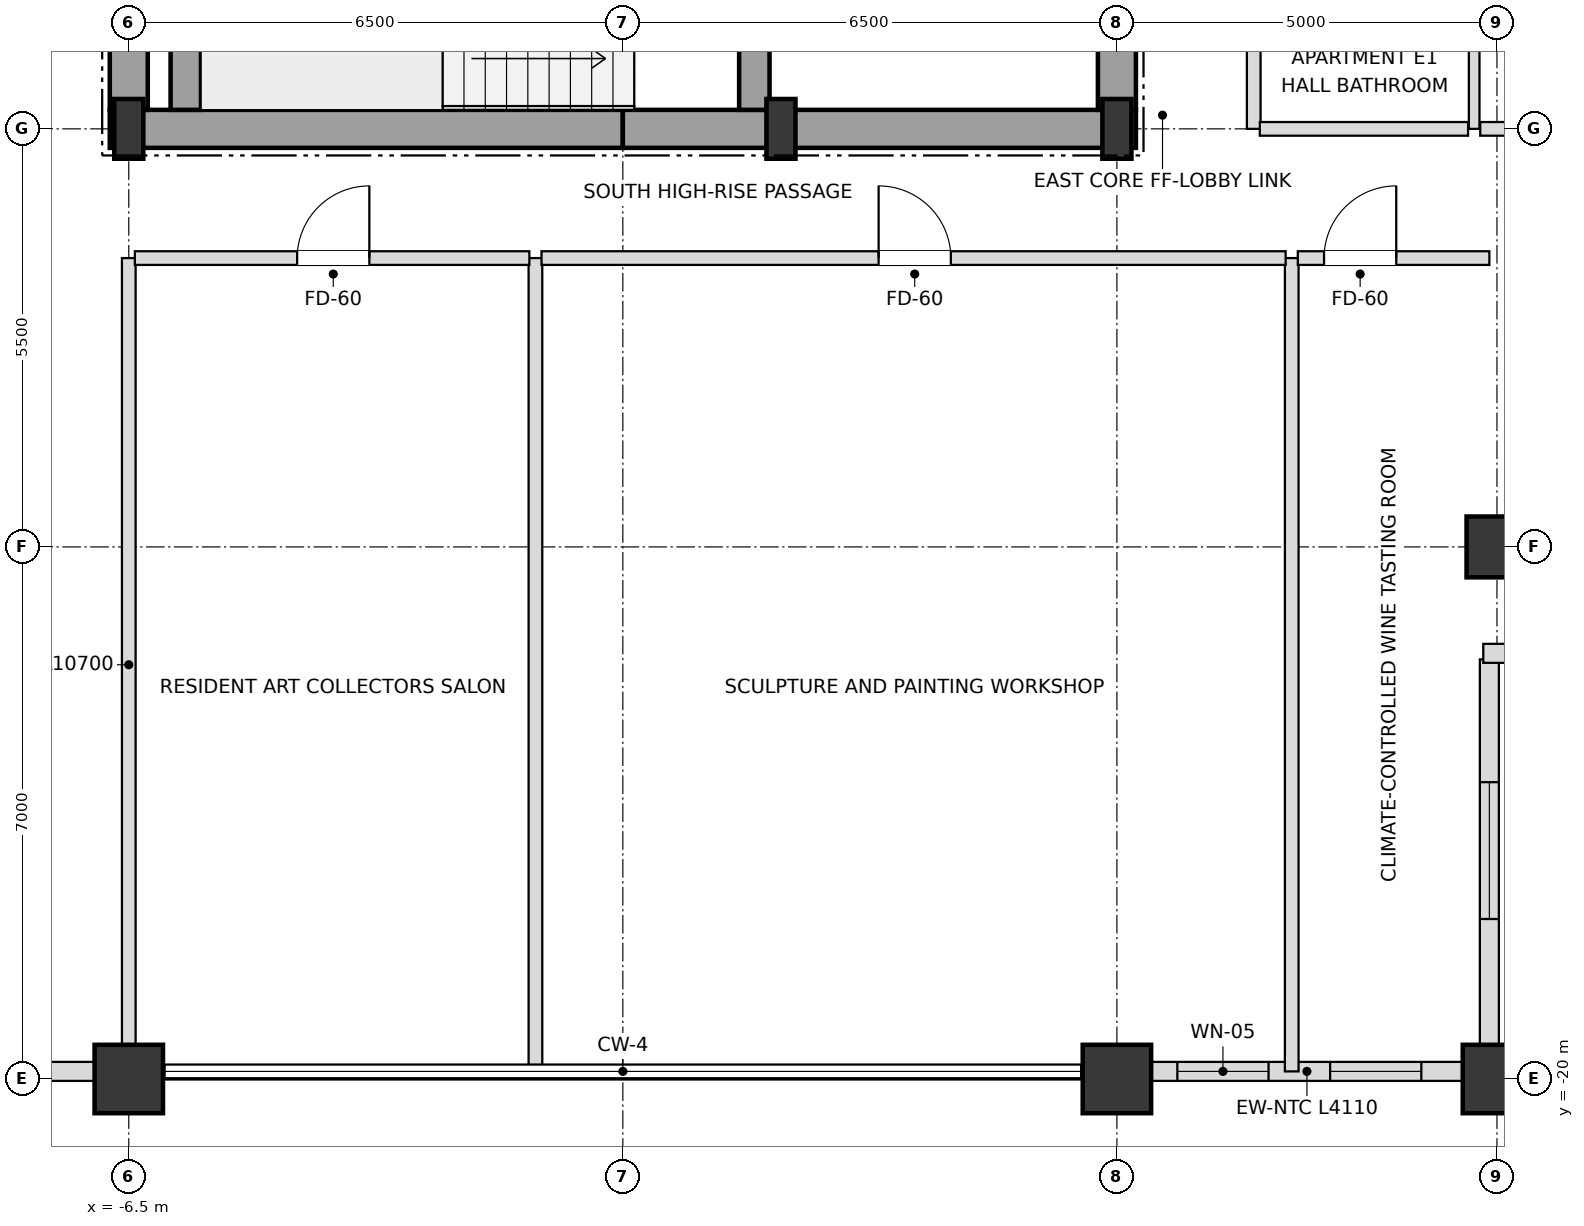
"""IFC4 building model, lengths in metres.
Left out: names, types, materials, properties, quantities, classifications, styles, units other than length and angle.
Written with IfcOpenShell. Run it as: python <this file> out.ifc"""

import sys

from ifc_helpers import new_model, si_unit, direction, frame, frame_2d, origin, origin_2d, place, context, subcontext, project, spatial, rectangle, i_section, extrude, element, fill, save


model = new_model("IFC4")
c1 = context("Model", 3, precision=1e-05, world=origin(), true_north=direction((0.0, 1.0)))
c2 = subcontext(c1, "Body", "Model", "MODEL_VIEW")
j1 = project(units=[si_unit("LENGTHUNIT", "METRE"), si_unit("PLANEANGLEUNIT", "RADIAN")], contexts=[c1])
p1 = place(None, origin())
s1 = spatial("IfcSite", under=j1, at=p1, CompositionType="ELEMENT")
p2 = place(p1, origin())
s2 = spatial("IfcBuilding", under=s1, at=p2, CompositionType="ELEMENT")
p3 = place(p2, frame((0.0, 0.0, 290.7)))
s3 = spatial("IfcBuildingStorey", under=s2, at=p3, CompositionType="ELEMENT", Elevation=290.7)
for number, where, z_axis, x_axis in (
    (1, (-6.5, -7.5, 0.0), (0.0, 0.0, 1.0), (1.0, 0.0, 0.0)),
    (2, (2.08, -7.5, 0.0), (0.0, 0.0, 1.0), (1.0, 0.0, 0.0)),
    (3, (6.5, -7.5, 0.0), (0.0, 0.0, 1.0), (1.0, 0.0, 0.0)),
):
    element("IfcColumn", number, at=place(p3, frame(where, z_axis=z_axis, x_axis=x_axis)), inside=s3, PredefinedType="COLUMN", context=c2, shape_type="SweptSolid", body=[
        extrude(i_section(OverallWidth=0.382, OverallDepth=0.786, WebThickness=0.02, FlangeThickness=0.033, at=origin_2d()), origin(), (0.0, 0.0, 1.0), 3.6),
    ])
for number, where, z_axis, x_axis in (
    (4, (-6.5, -20.0, 0.0), (0.0, 0.0, 1.0), (1.0, 0.0, 0.0)),
    (5, (6.5, -20.0, 0.0), (0.0, 0.0, 1.0), (1.0, 0.0, 0.0)),
    (6, (11.5, -20.0, 0.0), (0.0, 0.0, 1.0), (1.0, 0.0, 0.0)),
):
    element("IfcColumn", number, at=place(p3, frame(where, z_axis=z_axis, x_axis=x_axis)), inside=s3, PredefinedType="USERDEFINED", context=c2, shape_type="SweptSolid", body=[
        extrude(rectangle(XDim=0.9, YDim=0.9, at=origin_2d()), origin(), (0.0, 0.0, 1.0), 3.6),
    ])
p4 = place(p3, frame((11.5, -13.0, 0.0), z_axis=(0.0, 0.0, 1.0), x_axis=(1.0, 0.0, 0.0)))
e7 = element("IfcColumn", 7, at=p4, inside=s3, PredefinedType="COLUMN", context=c2, shape_type="SweptSolid", body=[
    extrude(rectangle(XDim=0.8, YDim=0.8, at=origin_2d()), origin(), (0.0, 0.0, 1.0), 3.6),
])
p5 = place(p3, frame((-11.055, -19.9, 0.0), z_axis=(0.0, 0.0, 1.0), x_axis=(1.0, 0.0, 0.0)))
e8 = element("IfcWall", 8, at=p5, inside=s3, PredefinedType="SOLIDWALL", context=c2, shape_type="SweptSolid", body=[
    extrude(rectangle(XDim=4.11, YDim=0.25, at=frame_2d((2.055, 0.0))), origin(), (0.0, 0.0, 1.0), 2.748),
])
p6 = place(p5, frame((1.155, 0.0, 0.72)))
e9 = element("IfcOpeningElement", 9, at=p6, cuts=e8, PredefinedType="OPENING", context=c2, shape_type="SweptSolid", body=[
    extrude(rectangle(XDim=1.8, YDim=1.68, at=frame_2d((0.9, 0.84))), frame((0.0, 0.135, 0.0), z_axis=(0.0, -1.0, 0.0), x_axis=(1.0, 0.0, 0.0)), (0.0, 0.0, 1.0), 0.27),
])
p7 = place(p3, frame((6.945, -19.9, 0.0), z_axis=(0.0, 0.0, 1.0), x_axis=(1.0, 0.0, 0.0)))
e10 = element("IfcWall", 10, at=p7, inside=s3, PredefinedType="SOLIDWALL", context=c2, shape_type="SweptSolid", body=[
    extrude(rectangle(XDim=4.11, YDim=0.25, at=frame_2d((2.055, 0.0))), origin(), (0.0, 0.0, 1.0), 2.748),
])
p8 = place(p7, frame((0.35, 0.0, 0.72)))
e11 = element("IfcOpeningElement", 11, at=p8, cuts=e10, PredefinedType="OPENING", context=c2, shape_type="SweptSolid", body=[
    extrude(rectangle(XDim=1.2, YDim=1.68, at=frame_2d((0.6, 0.84))), frame((0.0, 0.135, 0.0), z_axis=(0.0, -1.0, 0.0), x_axis=(1.0, 0.0, 0.0)), (0.0, 0.0, 1.0), 0.27),
])
p9 = place(p7, frame((2.36, 0.0, 0.72)))
e12 = element("IfcOpeningElement", 12, at=p9, cuts=e10, PredefinedType="OPENING", context=c2, shape_type="SweptSolid", body=[
    extrude(rectangle(XDim=1.2, YDim=1.68, at=frame_2d((0.6, 0.84))), frame((0.0, 0.135, 0.0), z_axis=(0.0, -1.0, 0.0), x_axis=(1.0, 0.0, 0.0)), (0.0, 0.0, 1.0), 0.27),
])
p10 = place(p3, frame((11.4, -19.82, 0.0), z_axis=(0.0, 0.0, 1.0), x_axis=(0.0, 1.0, 0.0)))
e13 = element("IfcWall", 13, at=p10, inside=s3, PredefinedType="SOLIDWALL", context=c2, shape_type="SweptSolid", body=[
    extrude(rectangle(XDim=5.34, YDim=0.25, at=frame_2d((2.67, 0.0))), origin(), (0.0, 0.0, 1.0), 2.748),
])
p11 = place(p10, frame((1.925, 0.0, 0.72)))
e14 = element("IfcOpeningElement", 14, at=p11, cuts=e13, PredefinedType="OPENING", context=c2, shape_type="SweptSolid", body=[
    extrude(rectangle(XDim=1.8, YDim=1.68, at=frame_2d((0.9, 0.84))), frame((0.0, 0.135, 0.0), z_axis=(0.0, -1.0, 0.0), x_axis=(1.0, 0.0, 0.0)), (0.0, 0.0, 1.0), 0.27),
])
p12 = place(p3, frame((11.32, -14.4, 0.0), z_axis=(0.0, 0.0, 1.0), x_axis=(1.0, 0.0, 0.0)))
e15 = element("IfcWall", 15, at=p12, inside=s3, PredefinedType="SOLIDWALL", context=c2, shape_type="SweptSolid", body=[
    extrude(rectangle(XDim=5.66, YDim=0.25, at=frame_2d((2.83, 0.0))), origin(), (0.0, 0.0, 1.0), 2.748),
])
p13 = place(p12, frame((0.595, 0.0, 0.72)))
e16 = element("IfcOpeningElement", 16, at=p13, cuts=e15, PredefinedType="OPENING", context=c2, shape_type="SweptSolid", body=[
    extrude(rectangle(XDim=1.8, YDim=1.68, at=frame_2d((0.9, 0.84))), frame((0.0, 0.135, 0.0), z_axis=(0.0, -1.0, 0.0), x_axis=(1.0, 0.0, 0.0)), (0.0, 0.0, 1.0), 0.27),
])
p14 = place(p12, frame((3.265, 0.0, 0.72)))
e17 = element("IfcOpeningElement", 17, at=p14, cuts=e15, PredefinedType="OPENING", context=c2, shape_type="SweptSolid", body=[
    extrude(rectangle(XDim=1.8, YDim=1.68, at=frame_2d((0.9, 0.84))), frame((0.0, 0.135, 0.0), z_axis=(0.0, -1.0, 0.0), x_axis=(1.0, 0.0, 0.0)), (0.0, 0.0, 1.0), 0.27),
])
for number, where, z_axis, x_axis in (
    (18, (-6.75, -7.5, 0.0), (0.0, 0.0, 1.0), (1.0, 0.0, 0.0)),
    (19, (0.0, -7.5, 0.0), (0.0, 0.0, 1.0), (1.0, 0.0, 0.0)),
):
    element("IfcWall", number, at=place(p3, frame(where, z_axis=z_axis, x_axis=x_axis)), inside=s3, PredefinedType="SHEAR", context=c2, shape_type="SweptSolid", body=[
        extrude(rectangle(XDim=6.75, YDim=0.5, at=frame_2d((3.375, 0.0))), origin(), (0.0, 0.0, 1.0), 3.38),
    ])
p15 = place(p3, frame((-6.5, -7.25, 0.0), z_axis=(0.0, 0.0, 1.0), x_axis=(0.0, 1.0, 0.0)))
e20 = element("IfcWall", 20, at=p15, inside=s3, PredefinedType="SHEAR", context=c2, shape_type="SweptSolid", body=[
    extrude(rectangle(XDim=3.55, YDim=0.5, at=frame_2d((1.775, 0.0))), origin(), (0.0, 0.0, 1.0), 3.38),
])
p16 = place(p3, frame((6.5, -7.25, 0.0), z_axis=(0.0, 0.0, 1.0), x_axis=(0.0, 1.0, 0.0)))
e21 = element("IfcWall", 21, at=p16, inside=s3, PredefinedType="SHEAR", context=c2, shape_type="SweptSolid", body=[
    extrude(rectangle(XDim=5.75, YDim=0.5, at=frame_2d((2.875, 0.0))), origin(), (0.0, 0.0, 1.0), 3.38),
])
p17 = place(p16, frame((0.85, 0.0, 0.0)))
e22 = element("IfcOpeningElement", 22, at=p17, cuts=e21, PredefinedType="OPENING", context=c2, shape_type="SweptSolid", body=[
    extrude(rectangle(XDim=1.05, YDim=2.15, at=frame_2d((0.525, 1.075))), frame((0.0, 0.26, 0.0), z_axis=(0.0, -1.0, 0.0), x_axis=(1.0, 0.0, 0.0)), (0.0, 0.0, 1.0), 0.52),
])
p18 = place(p3, frame((-5.75, -7.25, 0.0), z_axis=(0.0, 0.0, 1.0), x_axis=(0.0, 1.0, 0.0)))
e23 = element("IfcWall", 23, at=p18, inside=s3, PredefinedType="SHEAR", context=c2, shape_type="SweptSolid", body=[
    extrude(rectangle(XDim=2.9, YDim=0.4, at=frame_2d((1.45, 0.0))), origin(), (0.0, 0.0, 1.0), 3.38),
])
p19 = place(p3, frame((1.73, -7.25, 0.0), z_axis=(0.0, 0.0, 1.0), x_axis=(0.0, 1.0, 0.0)))
e24 = element("IfcWall", 24, at=p19, inside=s3, PredefinedType="SHEAR", context=c2, shape_type="SweptSolid", body=[
    extrude(rectangle(XDim=3.3, YDim=0.4, at=frame_2d((1.65, 0.0))), origin(), (0.0, 0.0, 1.0), 3.38),
])
p20 = place(p19, frame((0.9, 0.0, 0.0)))
e25 = element("IfcOpeningElement", 25, at=p20, cuts=e24, PredefinedType="OPENING", context=c2, shape_type="SweptSolid", body=[
    extrude(rectangle(XDim=1.05, YDim=2.15, at=frame_2d((0.525, 1.075))), frame((0.0, 0.21, 0.0), z_axis=(0.0, -1.0, 0.0), x_axis=(1.0, 0.0, 0.0)), (0.0, 0.0, 1.0), 0.42),
])
p21 = place(p3, frame((-6.5, -19.9, 0.0), z_axis=(0.0, 0.0, 1.0), x_axis=(0.0, 1.0, 0.0)))
e26 = element("IfcWall", 26, at=p21, inside=s3, PredefinedType="PARTITIONING", context=c2, shape_type="SweptSolid", body=[
    extrude(rectangle(XDim=10.7, YDim=0.18, at=frame_2d((5.35, 0.0))), origin(), (0.0, 0.0, 1.0), 2.826),
])
p22 = place(p3, frame((-1.15, -19.9, 0.0), z_axis=(0.0, 0.0, 1.0), x_axis=(0.0, 1.0, 0.0)))
e27 = element("IfcWall", 27, at=p22, inside=s3, PredefinedType="PARTITIONING", context=c2, shape_type="SweptSolid", body=[
    extrude(rectangle(XDim=10.7, YDim=0.18, at=frame_2d((5.35, 0.0))), origin(), (0.0, 0.0, 1.0), 3.018),
])
p23 = place(p3, frame((8.3, -7.5, 0.0), z_axis=(0.0, 0.0, 1.0), x_axis=(0.0, 1.0, 0.0)))
e28 = element("IfcWall", 28, at=p23, inside=s3, PredefinedType="PARTITIONING", context=c2, shape_type="SweptSolid", body=[
    extrude(rectangle(XDim=15.0, YDim=0.18, at=frame_2d((7.5, 0.0))), origin(), (0.0, 0.0, 1.0), 3.38),
])
p24 = place(p23, frame((2.355, 0.0, 0.0)))
e29 = element("IfcOpeningElement", 29, at=p24, cuts=e28, PredefinedType="OPENING", context=c2, shape_type="SweptSolid", body=[
    extrude(rectangle(XDim=0.95, YDim=2.15, at=frame_2d((0.475, 1.075))), frame((0.0, 0.1, 0.0), z_axis=(0.0, -1.0, 0.0), x_axis=(1.0, 0.0, 0.0)), (0.0, 0.0, 1.0), 0.2),
])
p25 = place(p3, frame((8.8, -19.9, 0.0), z_axis=(0.0, 0.0, 1.0), x_axis=(0.0, 1.0, 0.0)))
e30 = element("IfcWall", 30, at=p25, inside=s3, PredefinedType="PARTITIONING", context=c2, shape_type="SweptSolid", body=[
    extrude(rectangle(XDim=10.7, YDim=0.18, at=frame_2d((5.35, 0.0))), origin(), (0.0, 0.0, 1.0), 2.826),
])
p26 = place(p3, frame((11.2, -7.5, 0.0), z_axis=(0.0, 0.0, 1.0), x_axis=(0.0, 1.0, 0.0)))
e31 = element("IfcWall", 31, at=p26, inside=s3, PredefinedType="PARTITIONING", context=c2, shape_type="SweptSolid", body=[
    extrude(rectangle(XDim=15.0, YDim=0.14, at=frame_2d((7.5, 0.0))), origin(), (0.0, 0.0, 1.0), 3.38),
])
p27 = place(p26, frame((3.475, 0.0, 0.0)))
e32 = element("IfcOpeningElement", 32, at=p27, cuts=e31, PredefinedType="OPENING", context=c2, shape_type="SweptSolid", body=[
    extrude(rectangle(XDim=0.95, YDim=2.1, at=frame_2d((0.475, 1.05))), frame((0.0, 0.08, 0.0), z_axis=(0.0, -1.0, 0.0), x_axis=(1.0, 0.0, 0.0)), (0.0, 0.0, 1.0), 0.16),
])
p28 = place(p3, frame((-6.42, -9.2, 0.0), z_axis=(0.0, 0.0, 1.0), x_axis=(1.0, 0.0, 0.0)))
e33 = element("IfcWall", 33, at=p28, inside=s3, PredefinedType="PARTITIONING", context=c2, shape_type="SweptSolid", body=[
    extrude(rectangle(XDim=5.19, YDim=0.18, at=frame_2d((2.595, 0.0))), origin(), (0.0, 0.0, 1.0), 3.38),
])
p29 = place(p28, frame((2.135, 0.0, 0.0)))
e34 = element("IfcOpeningElement", 34, at=p29, cuts=e33, PredefinedType="OPENING", context=c2, shape_type="SweptSolid", body=[
    extrude(rectangle(XDim=0.95, YDim=2.15, at=frame_2d((0.475, 1.075))), frame((0.0, 0.1, 0.0), z_axis=(0.0, -1.0, 0.0), x_axis=(1.0, 0.0, 0.0)), (0.0, 0.0, 1.0), 0.2),
])
p30 = place(p3, frame((-1.07, -9.2, 0.0), z_axis=(0.0, 0.0, 1.0), x_axis=(1.0, 0.0, 0.0)))
e35 = element("IfcWall", 35, at=p30, inside=s3, PredefinedType="PARTITIONING", context=c2, shape_type="SweptSolid", body=[
    extrude(rectangle(XDim=9.79, YDim=0.18, at=frame_2d((4.895, 0.0))), origin(), (0.0, 0.0, 1.0), 2.826),
])
p31 = place(p30, frame((4.435, 0.0, 0.0)))
e36 = element("IfcOpeningElement", 36, at=p31, cuts=e35, PredefinedType="OPENING", context=c2, shape_type="SweptSolid", body=[
    extrude(rectangle(XDim=0.95, YDim=2.15, at=frame_2d((0.475, 1.075))), frame((0.0, 0.1, 0.0), z_axis=(0.0, -1.0, 0.0), x_axis=(1.0, 0.0, 0.0)), (0.0, 0.0, 1.0), 0.2),
])
p32 = place(p3, frame((8.88, -9.2, 0.0), z_axis=(0.0, 0.0, 1.0), x_axis=(1.0, 0.0, 0.0)))
e37 = element("IfcWall", 37, at=p32, inside=s3, PredefinedType="PARTITIONING", context=c2, shape_type="SweptSolid", body=[
    extrude(rectangle(XDim=2.52, YDim=0.18, at=frame_2d((1.26, 0.0))), origin(), (0.0, 0.0, 1.0), 3.38),
])
p33 = place(p32, frame((0.345, 0.0, 0.0)))
e38 = element("IfcOpeningElement", 38, at=p33, cuts=e37, PredefinedType="OPENING", context=c2, shape_type="SweptSolid", body=[
    extrude(rectangle(XDim=0.95, YDim=2.15, at=frame_2d((0.475, 1.075))), frame((0.0, 0.1, 0.0), z_axis=(0.0, -1.0, 0.0), x_axis=(1.0, 0.0, 0.0)), (0.0, 0.0, 1.0), 0.2),
])
p34 = place(p3, frame((8.38, -7.5, 0.0), z_axis=(0.0, 0.0, 1.0), x_axis=(1.0, 0.0, 0.0)))
e39 = element("IfcWall", 39, at=p34, inside=s3, PredefinedType="PARTITIONING", context=c2, shape_type="SweptSolid", body=[
    extrude(rectangle(XDim=2.74, YDim=0.18, at=frame_2d((1.37, 0.0))), origin(), (0.0, 0.0, 1.0), 2.826),
])
p35 = place(p3, frame((11.28, -7.5, 0.0), z_axis=(0.0, 0.0, 1.0), x_axis=(1.0, 0.0, 0.0)))
e40 = element("IfcWall", 40, at=p35, inside=s3, PredefinedType="PARTITIONING", context=c2, shape_type="SweptSolid", body=[
    extrude(rectangle(XDim=5.62, YDim=0.18, at=frame_2d((2.81, 0.0))), origin(), (0.0, 0.0, 1.0), 2.826),
])
p36 = place(p8, origin())
e41 = element("IfcWindow", 41, at=p36, inside=s3, PartitioningType="SINGLE_PANEL", PredefinedType="WINDOW", context=c2, shape_type="SweptSolid", body=[
    extrude(rectangle(XDim=1.2, YDim=1.68, at=frame_2d((0.6, 0.84))), frame((0.0, 0.03, 0.0), z_axis=(0.0, -1.0, 0.0), x_axis=(1.0, 0.0, 0.0)), (0.0, 0.0, 1.0), 0.06),
])
fill(e11, e41)
p37 = place(p9, origin())
e42 = element("IfcWindow", 42, at=p37, inside=s3, PartitioningType="SINGLE_PANEL", PredefinedType="WINDOW", context=c2, shape_type="SweptSolid", body=[
    extrude(rectangle(XDim=1.2, YDim=1.68, at=frame_2d((0.6, 0.84))), frame((0.0, 0.03, 0.0), z_axis=(0.0, -1.0, 0.0), x_axis=(1.0, 0.0, 0.0)), (0.0, 0.0, 1.0), 0.06),
])
fill(e12, e42)
p38 = place(p11, origin())
e43 = element("IfcWindow", 43, at=p38, inside=s3, PartitioningType="SINGLE_PANEL", PredefinedType="WINDOW", context=c2, shape_type="SweptSolid", body=[
    extrude(rectangle(XDim=1.8, YDim=1.68, at=frame_2d((0.9, 0.84))), frame((0.0, 0.03, 0.0), z_axis=(0.0, -1.0, 0.0), x_axis=(1.0, 0.0, 0.0)), (0.0, 0.0, 1.0), 0.06),
])
fill(e14, e43)
p39 = place(p29, origin())
e44 = element("IfcDoor", 44, at=p39, inside=s3, OperationType="SINGLE_SWING_RIGHT", PredefinedType="DOOR", context=c2, shape_type="SweptSolid", body=[
    extrude(rectangle(XDim=0.95, YDim=2.15, at=frame_2d((0.475, 1.075))), frame((0.0, 0.025, 0.0), z_axis=(0.0, -1.0, 0.0), x_axis=(1.0, 0.0, 0.0)), (0.0, 0.0, 1.0), 0.05),
])
fill(e34, e44)
p40 = place(p31, origin())
e45 = element("IfcDoor", 45, at=p40, inside=s3, OperationType="SINGLE_SWING_LEFT", PredefinedType="DOOR", context=c2, shape_type="SweptSolid", body=[
    extrude(rectangle(XDim=0.95, YDim=2.15, at=frame_2d((0.475, 1.075))), frame((0.0, 0.025, 0.0), z_axis=(0.0, -1.0, 0.0), x_axis=(1.0, 0.0, 0.0)), (0.0, 0.0, 1.0), 0.05),
])
fill(e36, e45)
p41 = place(p33, origin())
e46 = element("IfcDoor", 46, at=p41, inside=s3, OperationType="SINGLE_SWING_RIGHT", PredefinedType="DOOR", context=c2, shape_type="SweptSolid", body=[
    extrude(rectangle(XDim=0.95, YDim=2.15, at=frame_2d((0.475, 1.075))), frame((0.0, 0.025, 0.0), z_axis=(0.0, -1.0, 0.0), x_axis=(1.0, 0.0, 0.0)), (0.0, 0.0, 1.0), 0.05),
])
fill(e38, e46)
save(model, sys.argv[1])
